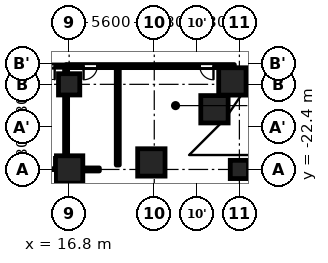
"""IFC4 building model, lengths in metres.
Left out: names, types, materials, properties, quantities, classifications, styles, units other than length and angle.
Written with IfcOpenShell. Run it as: python <this file> out.ifc"""

import sys

from ifc_helpers import new_model, si_unit, direction, frame, frame_2d, origin, origin_2d, place, context, subcontext, project, spatial, polyline, rectangle, circle, outline, extrude, element, fill, save


model = new_model("IFC4")
c1 = context("Model", 3, precision=1e-05, world=origin(), true_north=direction((0.0, 1.0)))
c2 = subcontext(c1, "Body", "Model", "MODEL_VIEW")
j1 = project(units=[si_unit("LENGTHUNIT", "METRE"), si_unit("PLANEANGLEUNIT", "RADIAN")], contexts=[c1])
p1 = place(None, origin())
s1 = spatial("IfcSite", under=j1, at=p1, CompositionType="ELEMENT")
p2 = place(p1, origin())
s2 = spatial("IfcBuilding", under=s1, at=p2, CompositionType="ELEMENT")
p3 = place(p2, frame((0.0, 0.0, -4.5)))
s3 = spatial("IfcBuildingStorey", under=s2, at=p3, CompositionType="ELEMENT", Elevation=-4.5)
p4 = place(p3, frame((0.0, 0.0, -0.5)))
e1 = element("IfcWall", 1, at=p4, inside=s3, PredefinedType="SOLIDWALL", context=c2, shape_type="SweptSolid", body=[
    extrude(outline(polyline([(26.851, -20.0), (26.144, -20.0), (24.705, -21.438), (24.688, -21.45), (30.0, -21.45), (30.0, -20.95), (25.901, -20.95), (26.851, -20.0)])), origin(), (0.0, 0.0, 1.0), 5.0),
])
e2 = element("IfcWall", 2, at=p4, inside=s3, PredefinedType="SOLIDWALL", context=c2, shape_type="SweptSolid", body=[
    extrude(outline(polyline([(29.45, -10.0), (28.95, -10.0), (28.95, -14.49), (28.472, -16.996), (27.038, -19.105), (26.144, -20.0), (26.851, -20.0), (27.425, -19.426), (28.944, -17.191), (29.45, -14.537), (29.45, -10.0)])), origin(), (0.0, 0.0, 1.0), 5.0),
])
for number, where, z_axis, x_axis in (
    (3, (16.8, -22.4, 0.0), (0.0, 0.0, 1.0), (1.0, 0.0, 0.0)),
    (4, (22.209, -21.938, 0.0), (0.0, 0.0, 1.0), (1.0, 0.0, 0.0)),
    (5, (26.36, -18.44, 0.0), (0.0, 0.0, 1.0), (1.0, 0.0, 0.0)),
    (6, (27.538, -16.609, 0.0), (0.0, 0.0, 1.0), (1.0, 0.0, 0.0)),
):
    element("IfcColumn", number, at=place(p3, frame(where, z_axis=z_axis, x_axis=x_axis)), inside=s3, PredefinedType="COLUMN", context=c2, shape_type="SweptSolid", body=[
        extrude(rectangle(XDim=1.8, YDim=1.8, at=origin_2d()), origin(), (0.0, 0.0, 1.0), 4.5),
    ])
p5 = place(p3, frame((16.8, -16.8, 0.0), z_axis=(0.0, 0.0, 1.0), x_axis=(1.0, 0.0, 0.0)))
e7 = element("IfcColumn", 7, at=p5, inside=s3, PredefinedType="COLUMN", context=c2, shape_type="SweptSolid", body=[
    extrude(rectangle(XDim=1.4, YDim=1.4, at=origin_2d()), origin(), (0.0, 0.0, 1.0), 4.5),
])
p6 = place(p3, frame((28.0, -22.4, 0.0), z_axis=(0.0, 0.0, 1.0), x_axis=(1.0, 0.0, 0.0)))
e8 = element("IfcColumn", 8, at=p6, inside=s3, PredefinedType="COLUMN", context=c2, shape_type="SweptSolid", body=[
    extrude(circle(Radius=0.6, at=origin_2d()), origin(), (0.0, 0.0, 1.0), 4.5),
])
p7 = place(p3, frame((10.0, -22.4, 0.0), z_axis=(0.0, 0.0, 1.0), x_axis=(1.0, 0.0, 0.0)))
e9 = element("IfcWall", 9, at=p7, inside=s3, PredefinedType="PARTITIONING", context=c2, shape_type="SweptSolid", body=[
    extrude(rectangle(XDim=6.6, YDim=0.1, at=frame_2d((3.3, 0.0))), origin(), (0.0, 0.0, 1.0), 3.15),
])
p8 = place(p3, frame((16.6, -22.4, 0.0), z_axis=(0.0, 0.0, 1.0), x_axis=(1.0, 0.0, 0.0)))
e10 = element("IfcWall", 10, at=p8, inside=s3, PredefinedType="PARTITIONING", context=c2, shape_type="SweptSolid", body=[
    extrude(rectangle(XDim=2.19, YDim=0.2, at=frame_2d((1.095, 0.0))), origin(), (0.0, 0.0, 1.0), 3.15),
])
p9 = place(p3, frame((-27.67, -15.6, 0.0), z_axis=(0.0, 0.0, 1.0), x_axis=(1.0, 0.0, 0.0)))
e11 = element("IfcWall", 11, at=p9, inside=s3, PredefinedType="PARTITIONING", context=c2, shape_type="SweptSolid", body=[
    extrude(rectangle(XDim=44.27, YDim=0.15, at=frame_2d((22.135, 0.0))), origin(), (0.0, 0.0, 1.0), 4.05),
])
p10 = place(p9, frame((29.42, 0.0, 0.0)))
e12 = element("IfcOpeningElement", 12, at=p10, cuts=e11, PredefinedType="OPENING", context=c2, shape_type="SweptSolid", body=[
    extrude(rectangle(XDim=1.2, YDim=2.1, at=frame_2d((0.6, 1.05))), frame((0.0, 0.085, 0.0), z_axis=(0.0, -1.0, 0.0), x_axis=(1.0, 0.0, 0.0)), (0.0, 0.0, 1.0), 0.17),
])
p11 = place(p9, frame((1.141, 0.0, 0.0)))
e13 = element("IfcOpeningElement", 13, at=p11, cuts=e11, PredefinedType="OPENING", context=c2, shape_type="SweptSolid", body=[
    extrude(rectangle(XDim=0.9, YDim=2.1, at=frame_2d((0.45, 1.05))), frame((0.0, 0.085, 0.0), z_axis=(0.0, -1.0, 0.0), x_axis=(1.0, 0.0, 0.0)), (0.0, 0.0, 1.0), 0.17),
])
p12 = place(p9, frame((18.07, 0.0, 0.0)))
e14 = element("IfcOpeningElement", 14, at=p12, cuts=e11, PredefinedType="OPENING", context=c2, shape_type="SweptSolid", body=[
    extrude(rectangle(XDim=0.9, YDim=2.1, at=frame_2d((0.45, 1.05))), frame((0.0, 0.085, 0.0), z_axis=(0.0, -1.0, 0.0), x_axis=(1.0, 0.0, 0.0)), (0.0, 0.0, 1.0), 0.17),
])
p13 = place(p9, frame((20.32, 0.0, 0.0)))
e15 = element("IfcOpeningElement", 15, at=p13, cuts=e11, PredefinedType="OPENING", context=c2, shape_type="SweptSolid", body=[
    extrude(rectangle(XDim=0.9, YDim=2.1, at=frame_2d((0.45, 1.05))), frame((0.0, 0.085, 0.0), z_axis=(0.0, -1.0, 0.0), x_axis=(1.0, 0.0, 0.0)), (0.0, 0.0, 1.0), 0.17),
])
p14 = place(p9, frame((36.17, 0.0, 0.0)))
e16 = element("IfcOpeningElement", 16, at=p14, cuts=e11, PredefinedType="OPENING", context=c2, shape_type="SweptSolid", body=[
    extrude(rectangle(XDim=0.9, YDim=2.1, at=frame_2d((0.45, 1.05))), frame((0.0, 0.085, 0.0), z_axis=(0.0, -1.0, 0.0), x_axis=(1.0, 0.0, 0.0)), (0.0, 0.0, 1.0), 0.17),
])
p15 = place(p9, frame((39.82, 0.0, 0.0)))
e17 = element("IfcOpeningElement", 17, at=p15, cuts=e11, PredefinedType="OPENING", context=c2, shape_type="SweptSolid", body=[
    extrude(rectangle(XDim=0.9, YDim=2.1, at=frame_2d((0.45, 1.05))), frame((0.0, 0.085, 0.0), z_axis=(0.0, -1.0, 0.0), x_axis=(1.0, 0.0, 0.0)), (0.0, 0.0, 1.0), 0.17),
])
p16 = place(p9, frame((42.62, 0.0, 0.0)))
e18 = element("IfcOpeningElement", 18, at=p16, cuts=e11, PredefinedType="OPENING", context=c2, shape_type="SweptSolid", body=[
    extrude(rectangle(XDim=0.9, YDim=2.1, at=frame_2d((0.45, 1.05))), frame((0.0, 0.085, 0.0), z_axis=(0.0, -1.0, 0.0), x_axis=(1.0, 0.0, 0.0)), (0.0, 0.0, 1.0), 0.17),
])
p17 = place(p3, frame((16.6, -15.6, 0.0), z_axis=(0.0, 0.0, 1.0), x_axis=(1.0, 0.0, 0.0)))
e19 = element("IfcWall", 19, at=p17, inside=s3, PredefinedType="PARTITIONING", context=c2, shape_type="SweptSolid", body=[
    extrude(rectangle(XDim=11.07, YDim=0.2, at=frame_2d((5.535, 0.0))), origin(), (0.0, 0.0, 1.0), 4.05),
])
p18 = place(p17, frame((1.15, 0.0, 0.0)))
e20 = element("IfcOpeningElement", 20, at=p18, cuts=e19, PredefinedType="OPENING", context=c2, shape_type="SweptSolid", body=[
    extrude(rectangle(XDim=0.9, YDim=2.1, at=frame_2d((0.45, 1.05))), frame((0.0, 0.11, 0.0), z_axis=(0.0, -1.0, 0.0), x_axis=(1.0, 0.0, 0.0)), (0.0, 0.0, 1.0), 0.22),
])
p19 = place(p17, frame((8.795, 0.0, 0.0)))
e21 = element("IfcOpeningElement", 21, at=p19, cuts=e19, PredefinedType="OPENING", context=c2, shape_type="SweptSolid", body=[
    extrude(rectangle(XDim=0.9, YDim=2.1, at=frame_2d((0.45, 1.05))), frame((0.0, 0.11, 0.0), z_axis=(0.0, -1.0, 0.0), x_axis=(1.0, 0.0, 0.0)), (0.0, 0.0, 1.0), 0.22),
])
p20 = place(p3, frame((16.6, -22.35, 0.0), z_axis=(0.0, 0.0, 1.0), x_axis=(0.0, 1.0, 0.0)))
e22 = element("IfcWall", 22, at=p20, inside=s3, PredefinedType="PARTITIONING", context=c2, shape_type="SweptSolid", body=[
    extrude(rectangle(XDim=6.675, YDim=0.2, at=frame_2d((3.337, 0.0))), origin(), (0.0, 0.0, 1.0), 4.05),
])
p21 = place(p3, frame((20.0, -22.11, 0.0), z_axis=(0.0, 0.0, 1.0), x_axis=(0.0, 1.0, 0.0)))
e23 = element("IfcWall", 23, at=p21, inside=s3, PredefinedType="PARTITIONING", context=c2, shape_type="SweptSolid", body=[
    extrude(rectangle(XDim=6.41, YDim=0.2, at=frame_2d((3.205, 0.0))), origin(), (0.0, 0.0, 1.0), 4.05),
])
p22 = place(p16, origin())
e24 = element("IfcDoor", 24, at=p22, inside=s3, OperationType="SINGLE_SWING_RIGHT", PredefinedType="DOOR", context=c2, shape_type="SweptSolid", body=[
    extrude(rectangle(XDim=0.9, YDim=2.1, at=frame_2d((0.45, 1.05))), frame((0.0, 0.025, 0.0), z_axis=(0.0, -1.0, 0.0), x_axis=(1.0, 0.0, 0.0)), (0.0, 0.0, 1.0), 0.05),
])
fill(e18, e24)
p23 = place(p18, origin())
e25 = element("IfcDoor", 25, at=p23, inside=s3, OperationType="SINGLE_SWING_LEFT", PredefinedType="DOOR", context=c2, shape_type="SweptSolid", body=[
    extrude(rectangle(XDim=0.9, YDim=2.1, at=frame_2d((0.45, 1.05))), frame((0.0, 0.025, 0.0), z_axis=(0.0, -1.0, 0.0), x_axis=(1.0, 0.0, 0.0)), (0.0, 0.0, 1.0), 0.05),
])
fill(e20, e25)
p24 = place(p19, origin())
e26 = element("IfcDoor", 26, at=p24, inside=s3, OperationType="SINGLE_SWING_RIGHT", PredefinedType="DOOR", context=c2, shape_type="SweptSolid", body=[
    extrude(rectangle(XDim=0.9, YDim=2.1, at=frame_2d((0.45, 1.05))), frame((0.0, 0.025, 0.0), z_axis=(0.0, -1.0, 0.0), x_axis=(1.0, 0.0, 0.0)), (0.0, 0.0, 1.0), 0.05),
])
fill(e21, e26)
save(model, sys.argv[1])
